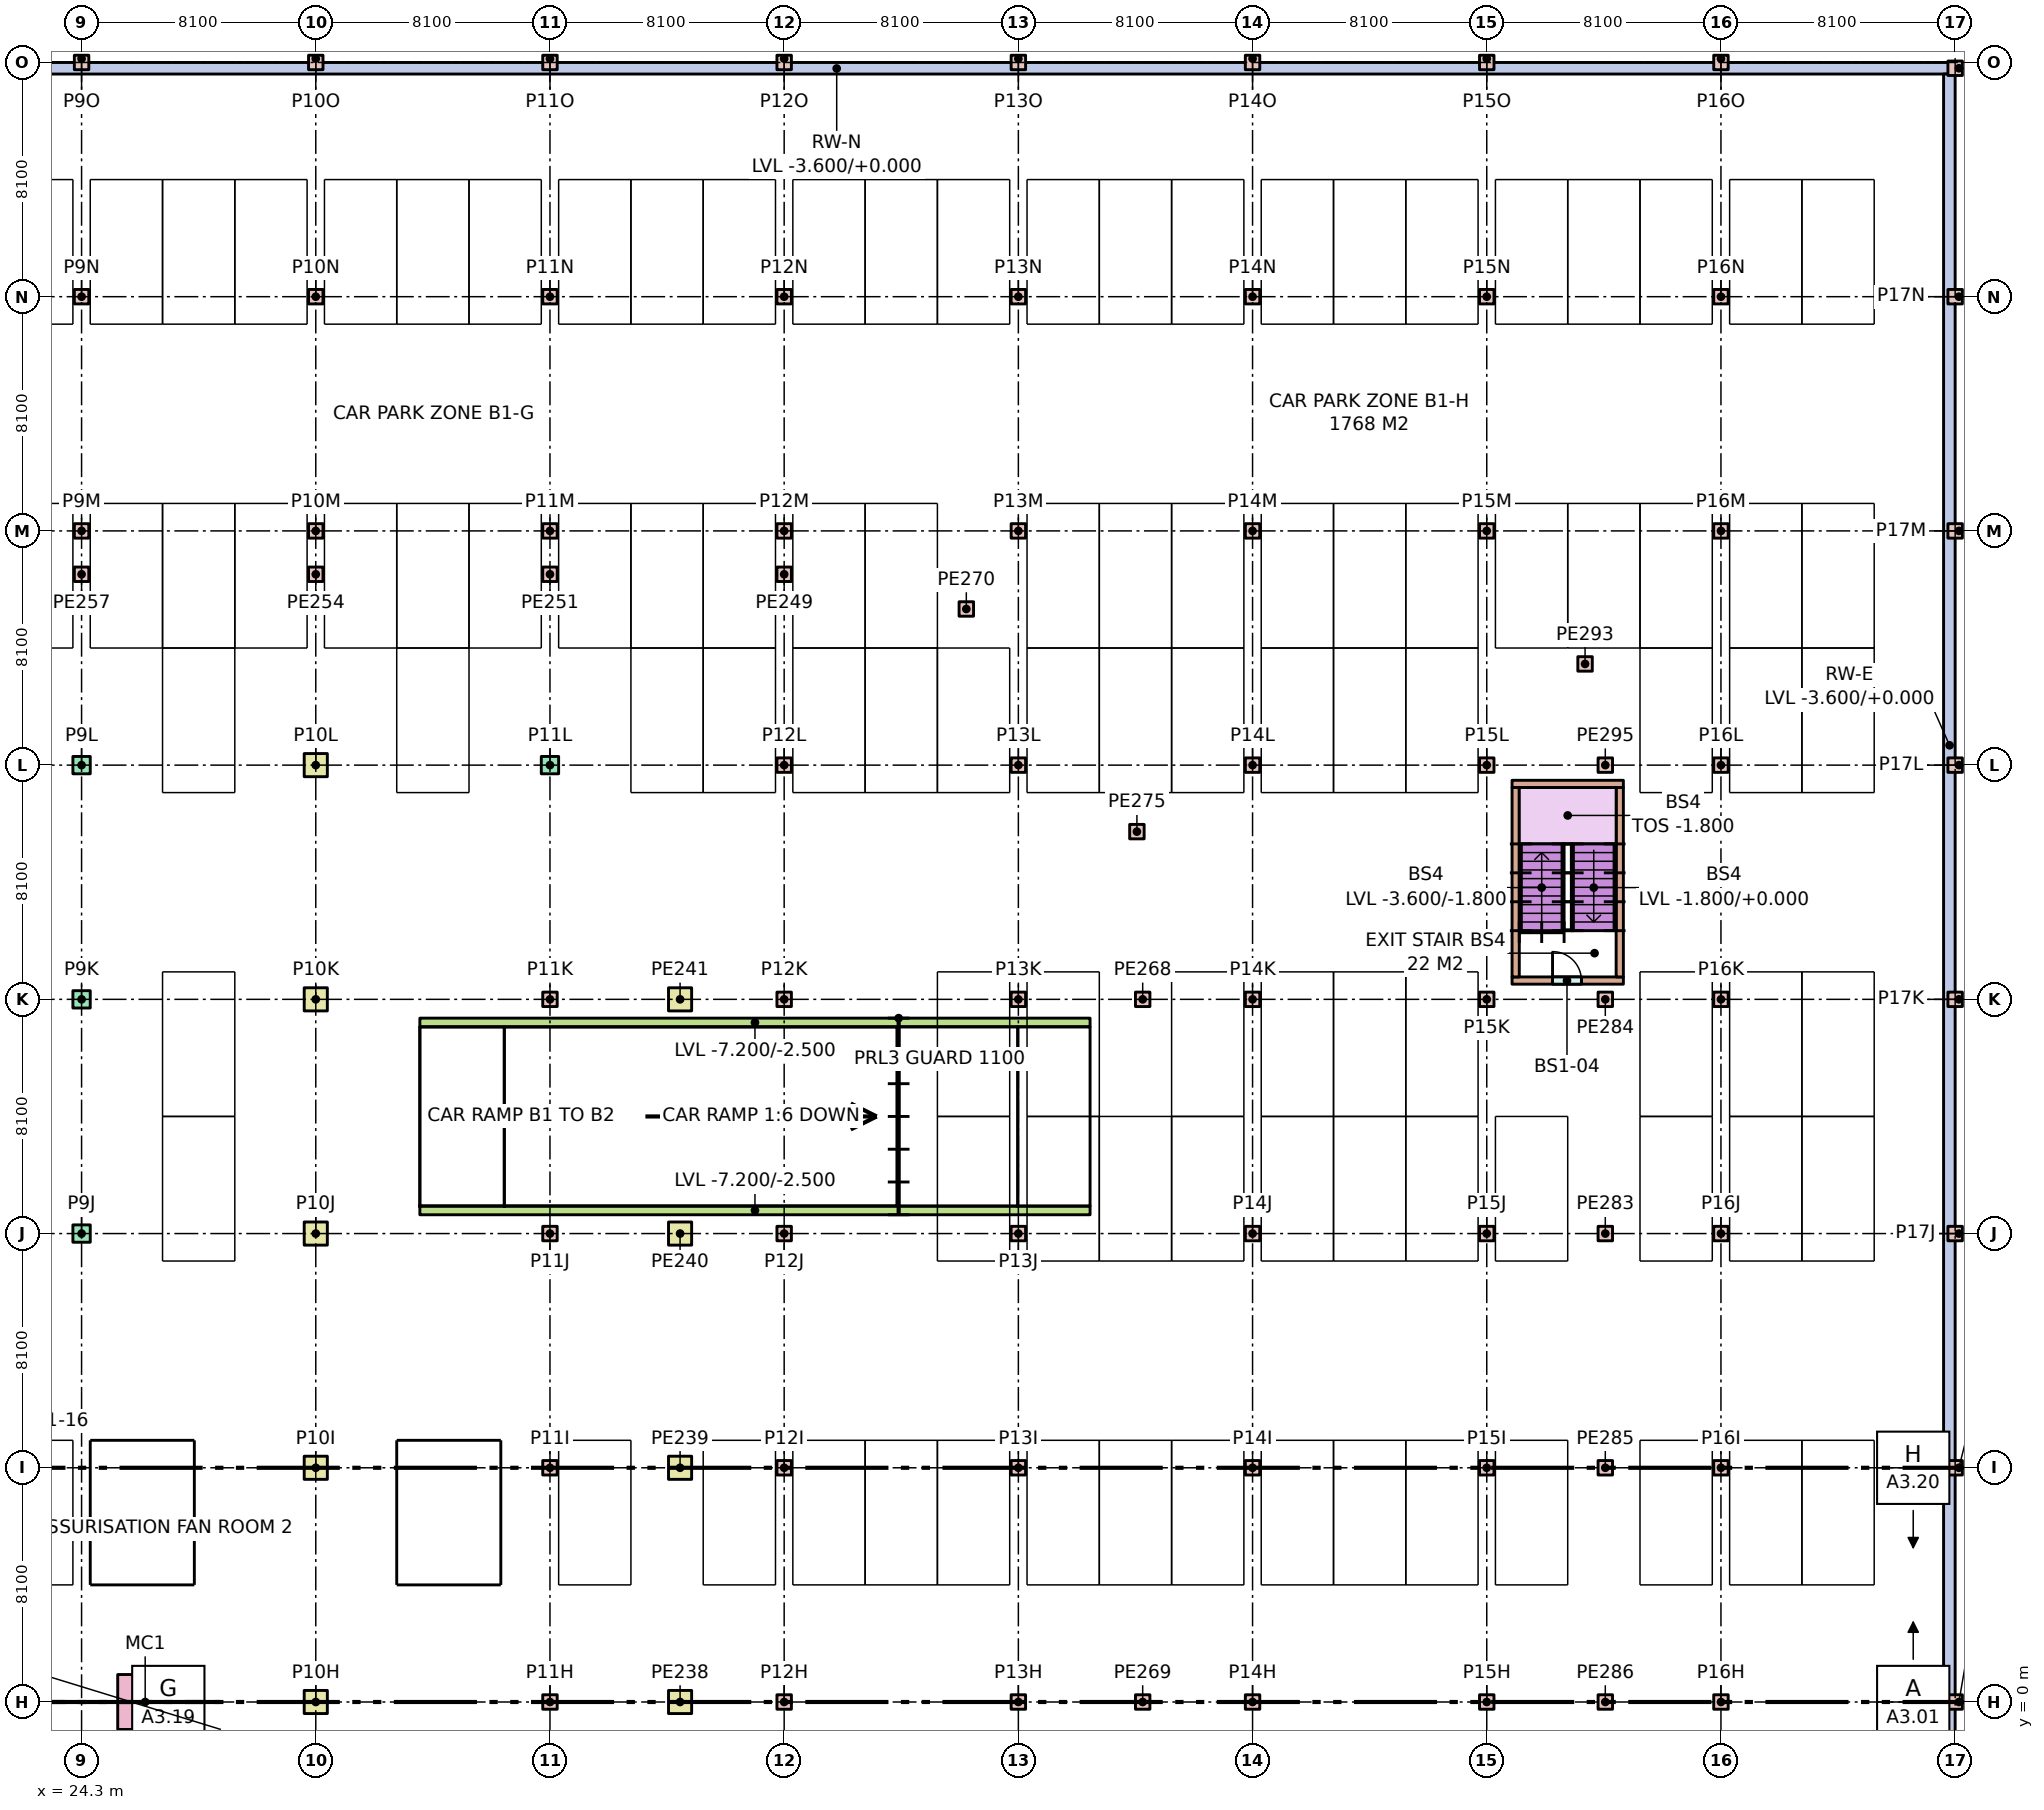
"""IFC4 building model, lengths in metres.
Left out: names, types, materials, properties, quantities, classifications, styles, units other than length and angle.
Written with IfcOpenShell. Run it as: python <this file> out.ifc"""

import sys

from ifc_helpers import new_model, si_unit, direction, frame, frame_2d, origin, origin_2d, place, context, subcontext, project, spatial, polyline, rectangle, outline, extrude, element, fill, save


model = new_model("IFC4")
c1 = context("Model", 3, precision=1e-05, world=origin(), true_north=direction((0.0, 1.0)))
c2 = subcontext(c1, "Body", "Model", "MODEL_VIEW")
j1 = project(units=[si_unit("LENGTHUNIT", "METRE"), si_unit("PLANEANGLEUNIT", "RADIAN")], contexts=[c1])
p1 = place(None, origin())
s1 = spatial("IfcSite", under=j1, at=p1, CompositionType="ELEMENT")
p2 = place(p1, origin())
s2 = spatial("IfcBuilding", under=s1, at=p2, CompositionType="ELEMENT")
p3 = place(p2, frame((0.0, 0.0, -3.6)))
s3 = spatial("IfcBuildingStorey", under=s2, at=p3, CompositionType="ELEMENT", Elevation=-3.6)
p4 = place(p3, frame((-40.5, 56.5, 0.0), z_axis=(0.0, 0.0, 1.0), x_axis=(1.0, 0.0, 0.0)))
e1 = element("IfcWall", 1, at=p4, inside=s3, PredefinedType="SOLIDWALL", context=c2, shape_type="SweptSolid", body=[
    extrude(rectangle(XDim=129.6, YDim=0.4, at=frame_2d((64.8, 0.0))), origin(), (0.0, 0.0, 1.0), 3.6),
])
p5 = place(p3, frame((88.9, -56.3, 0.0), z_axis=(0.0, 0.0, 1.0), x_axis=(0.0, 1.0, 0.0)))
e2 = element("IfcWall", 2, at=p5, inside=s3, PredefinedType="SOLIDWALL", context=c2, shape_type="SweptSolid", body=[
    extrude(rectangle(XDim=112.6, YDim=0.4, at=frame_2d((56.3, 0.0))), origin(), (0.0, 0.0, 1.0), 3.6),
])
for number, where, z_axis, x_axis in (
    (3, (24.3, 16.2, 0.0), (0.0, 0.0, 1.0), (1.0, 0.0, 0.0)),
    (4, (24.3, 24.3, 0.0), (0.0, 0.0, 1.0), (1.0, 0.0, 0.0)),
    (5, (24.3, 32.4, 0.0), (0.0, 0.0, 1.0), (1.0, 0.0, 0.0)),
):
    element("IfcColumn", number, at=place(p3, frame(where, z_axis=z_axis, x_axis=x_axis)), inside=s3, PredefinedType="COLUMN", context=c2, shape_type="SweptSolid", body=[
        extrude(rectangle(XDim=0.6, YDim=0.6, at=origin_2d()), origin(), (0.0, 0.0, 1.0), 3.6),
    ])
for number, where, z_axis, x_axis in (
    (6, (24.3, 40.5, 0.0), (0.0, 0.0, 1.0), (1.0, 0.0, 0.0)),
    (7, (24.3, 48.6, 0.0), (0.0, 0.0, 1.0), (1.0, 0.0, 0.0)),
    (8, (24.3, 56.7, 0.0), (0.0, 0.0, 1.0), (1.0, 0.0, 0.0)),
):
    element("IfcColumn", number, at=place(p3, frame(where, z_axis=z_axis, x_axis=x_axis)), inside=s3, PredefinedType="COLUMN", context=c2, shape_type="SweptSolid", body=[
        extrude(rectangle(XDim=0.5, YDim=0.5, at=origin_2d()), origin(), (0.0, 0.0, 1.0), 3.6),
    ])
for number, where, z_axis, x_axis in (
    (9, (32.4, 0.0, 0.0), (0.0, 0.0, 1.0), (1.0, 0.0, 0.0)),
    (10, (32.4, 8.1, 0.0), (0.0, 0.0, 1.0), (1.0, 0.0, 0.0)),
    (11, (32.4, 16.2, 0.0), (0.0, 0.0, 1.0), (1.0, 0.0, 0.0)),
    (12, (32.4, 24.3, 0.0), (0.0, 0.0, 1.0), (1.0, 0.0, 0.0)),
    (13, (32.4, 32.4, 0.0), (0.0, 0.0, 1.0), (1.0, 0.0, 0.0)),
):
    element("IfcColumn", number, at=place(p3, frame(where, z_axis=z_axis, x_axis=x_axis)), inside=s3, PredefinedType="COLUMN", context=c2, shape_type="SweptSolid", body=[
        extrude(rectangle(XDim=0.8, YDim=0.8, at=origin_2d()), origin(), (0.0, 0.0, 1.0), 3.6),
    ])
for number, where, z_axis, x_axis in (
    (14, (32.4, 40.5, 0.0), (0.0, 0.0, 1.0), (1.0, 0.0, 0.0)),
    (15, (32.4, 48.6, 0.0), (0.0, 0.0, 1.0), (1.0, 0.0, 0.0)),
    (16, (32.4, 56.7, 0.0), (0.0, 0.0, 1.0), (1.0, 0.0, 0.0)),
    (17, (40.5, 0.0, 0.0), (0.0, 0.0, 1.0), (1.0, 0.0, 0.0)),
    (18, (40.5, 8.1, 0.0), (0.0, 0.0, 1.0), (1.0, 0.0, 0.0)),
    (19, (40.5, 16.2, 0.0), (0.0, 0.0, 1.0), (1.0, 0.0, 0.0)),
    (20, (40.5, 24.3, 0.0), (0.0, 0.0, 1.0), (1.0, 0.0, 0.0)),
):
    element("IfcColumn", number, at=place(p3, frame(where, z_axis=z_axis, x_axis=x_axis)), inside=s3, PredefinedType="COLUMN", context=c2, shape_type="SweptSolid", body=[
        extrude(rectangle(XDim=0.5, YDim=0.5, at=origin_2d()), origin(), (0.0, 0.0, 1.0), 3.6),
    ])
p6 = place(p3, frame((40.5, 32.4, 0.0), z_axis=(0.0, 0.0, 1.0), x_axis=(1.0, 0.0, 0.0)))
e21 = element("IfcColumn", 21, at=p6, inside=s3, PredefinedType="COLUMN", context=c2, shape_type="SweptSolid", body=[
    extrude(rectangle(XDim=0.6, YDim=0.6, at=origin_2d()), origin(), (0.0, 0.0, 1.0), 3.6),
])
for number, where, z_axis, x_axis in (
    (22, (40.5, 40.5, 0.0), (0.0, 0.0, 1.0), (1.0, 0.0, 0.0)),
    (23, (40.5, 48.6, 0.0), (0.0, 0.0, 1.0), (1.0, 0.0, 0.0)),
    (24, (40.5, 56.7, 0.0), (0.0, 0.0, 1.0), (1.0, 0.0, 0.0)),
    (25, (48.6, 0.0, 0.0), (0.0, 0.0, 1.0), (1.0, 0.0, 0.0)),
    (26, (48.6, 8.1, 0.0), (0.0, 0.0, 1.0), (1.0, 0.0, 0.0)),
    (27, (48.6, 16.2, 0.0), (0.0, 0.0, 1.0), (1.0, 0.0, 0.0)),
    (28, (48.6, 24.3, 0.0), (0.0, 0.0, 1.0), (1.0, 0.0, 0.0)),
    (29, (48.6, 32.4, 0.0), (0.0, 0.0, 1.0), (1.0, 0.0, 0.0)),
    (30, (48.6, 40.5, 0.0), (0.0, 0.0, 1.0), (1.0, 0.0, 0.0)),
    (31, (48.6, 48.6, 0.0), (0.0, 0.0, 1.0), (1.0, 0.0, 0.0)),
    (32, (48.6, 56.7, 0.0), (0.0, 0.0, 1.0), (1.0, 0.0, 0.0)),
    (33, (56.7, 0.0, 0.0), (0.0, 0.0, 1.0), (1.0, 0.0, 0.0)),
    (34, (56.7, 8.1, 0.0), (0.0, 0.0, 1.0), (1.0, 0.0, 0.0)),
    (35, (56.7, 16.2, 0.0), (0.0, 0.0, 1.0), (1.0, 0.0, 0.0)),
    (36, (56.7, 24.3, 0.0), (0.0, 0.0, 1.0), (1.0, 0.0, 0.0)),
    (37, (56.7, 32.4, 0.0), (0.0, 0.0, 1.0), (1.0, 0.0, 0.0)),
    (38, (56.7, 40.5, 0.0), (0.0, 0.0, 1.0), (1.0, 0.0, 0.0)),
    (39, (56.7, 48.6, 0.0), (0.0, 0.0, 1.0), (1.0, 0.0, 0.0)),
    (40, (56.7, 56.7, 0.0), (0.0, 0.0, 1.0), (1.0, 0.0, 0.0)),
    (41, (64.8, 0.0, 0.0), (0.0, 0.0, 1.0), (1.0, 0.0, 0.0)),
    (42, (64.8, 8.1, 0.0), (0.0, 0.0, 1.0), (1.0, 0.0, 0.0)),
    (43, (64.8, 16.2, 0.0), (0.0, 0.0, 1.0), (1.0, 0.0, 0.0)),
    (44, (64.8, 24.3, 0.0), (0.0, 0.0, 1.0), (1.0, 0.0, 0.0)),
    (45, (64.8, 32.4, 0.0), (0.0, 0.0, 1.0), (1.0, 0.0, 0.0)),
    (46, (64.8, 40.5, 0.0), (0.0, 0.0, 1.0), (1.0, 0.0, 0.0)),
    (47, (64.8, 48.6, 0.0), (0.0, 0.0, 1.0), (1.0, 0.0, 0.0)),
    (48, (64.8, 56.7, 0.0), (0.0, 0.0, 1.0), (1.0, 0.0, 0.0)),
    (49, (72.9, 0.0, 0.0), (0.0, 0.0, 1.0), (1.0, 0.0, 0.0)),
    (50, (72.9, 8.1, 0.0), (0.0, 0.0, 1.0), (1.0, 0.0, 0.0)),
    (51, (72.9, 16.2, 0.0), (0.0, 0.0, 1.0), (1.0, 0.0, 0.0)),
    (52, (72.9, 24.3, 0.0), (0.0, 0.0, 1.0), (1.0, 0.0, 0.0)),
    (53, (72.9, 32.4, 0.0), (0.0, 0.0, 1.0), (1.0, 0.0, 0.0)),
    (54, (72.9, 40.5, 0.0), (0.0, 0.0, 1.0), (1.0, 0.0, 0.0)),
    (55, (72.9, 48.6, 0.0), (0.0, 0.0, 1.0), (1.0, 0.0, 0.0)),
    (56, (72.9, 56.7, 0.0), (0.0, 0.0, 1.0), (1.0, 0.0, 0.0)),
    (57, (81.0, 0.0, 0.0), (0.0, 0.0, 1.0), (1.0, 0.0, 0.0)),
    (58, (81.0, 8.1, 0.0), (0.0, 0.0, 1.0), (1.0, 0.0, 0.0)),
    (59, (81.0, 16.2, 0.0), (0.0, 0.0, 1.0), (1.0, 0.0, 0.0)),
    (60, (81.0, 24.3, 0.0), (0.0, 0.0, 1.0), (1.0, 0.0, 0.0)),
    (61, (81.0, 32.4, 0.0), (0.0, 0.0, 1.0), (1.0, 0.0, 0.0)),
    (62, (81.0, 40.5, 0.0), (0.0, 0.0, 1.0), (1.0, 0.0, 0.0)),
    (63, (81.0, 48.6, 0.0), (0.0, 0.0, 1.0), (1.0, 0.0, 0.0)),
    (64, (81.0, 56.7, 0.0), (0.0, 0.0, 1.0), (1.0, 0.0, 0.0)),
    (65, (89.1, 0.0, 0.0), (0.0, 0.0, 1.0), (1.0, 0.0, 0.0)),
    (66, (89.1, 8.1, 0.0), (0.0, 0.0, 1.0), (1.0, 0.0, 0.0)),
    (67, (89.1, 16.2, 0.0), (0.0, 0.0, 1.0), (1.0, 0.0, 0.0)),
    (68, (89.1, 24.3, 0.0), (0.0, 0.0, 1.0), (1.0, 0.0, 0.0)),
    (69, (89.1, 32.4, 0.0), (0.0, 0.0, 1.0), (1.0, 0.0, 0.0)),
    (70, (89.1, 40.5, 0.0), (0.0, 0.0, 1.0), (1.0, 0.0, 0.0)),
    (71, (89.1, 48.6, 0.0), (0.0, 0.0, 1.0), (1.0, 0.0, 0.0)),
    (72, (89.1, 56.5, 0.0), (0.0, 0.0, 1.0), (1.0, 0.0, 0.0)),
):
    element("IfcColumn", number, at=place(p3, frame(where, z_axis=z_axis, x_axis=x_axis)), inside=s3, PredefinedType="COLUMN", context=c2, shape_type="SweptSolid", body=[
        extrude(rectangle(XDim=0.5, YDim=0.5, at=origin_2d()), origin(), (0.0, 0.0, 1.0), 3.6),
    ])
for number, where, z_axis, x_axis in (
    (73, (45.0, 0.0, 0.0), (0.0, 0.0, 1.0), (1.0, 0.0, 0.0)),
    (74, (45.0, 8.1, 0.0), (0.0, 0.0, 1.0), (1.0, 0.0, 0.0)),
    (75, (45.0, 16.2, 0.0), (0.0, 0.0, 1.0), (1.0, 0.0, 0.0)),
    (76, (45.0, 24.3, 0.0), (0.0, 0.0, 1.0), (1.0, 0.0, 0.0)),
):
    element("IfcColumn", number, at=place(p3, frame(where, z_axis=z_axis, x_axis=x_axis)), inside=s3, PredefinedType="COLUMN", context=c2, shape_type="SweptSolid", body=[
        extrude(rectangle(XDim=0.8, YDim=0.8, at=origin_2d()), origin(), (0.0, 0.0, 1.0), 3.6),
    ])
for number, where, z_axis, x_axis in (
    (77, (48.6, 39.0, 0.0), (0.0, 0.0, 1.0), (1.0, 0.0, 0.0)),
    (78, (40.5, 39.0, 0.0), (0.0, 0.0, 1.0), (1.0, 0.0, 0.0)),
    (79, (32.4, 39.0, 0.0), (0.0, 0.0, 1.0), (1.0, 0.0, 0.0)),
    (80, (24.3, 39.0, 0.0), (0.0, 0.0, 1.0), (1.0, 0.0, 0.0)),
    (81, (61.0, 24.3, 0.0), (0.0, 0.0, 1.0), (1.0, 0.0, 0.0)),
    (82, (61.0, 0.0, 0.0), (0.0, 0.0, 1.0), (1.0, 0.0, 0.0)),
    (83, (54.9, 37.8, 0.0), (0.0, 0.0, 1.0), (1.0, 0.0, 0.0)),
    (84, (60.8, 30.1, 0.0), (0.0, 0.0, 1.0), (1.0, 0.0, 0.0)),
    (85, (77.0, 16.2, 0.0), (0.0, 0.0, 1.0), (1.0, 0.0, 0.0)),
    (86, (77.0, 24.3, 0.0), (0.0, 0.0, 1.0), (1.0, 0.0, 0.0)),
    (87, (77.0, 8.1, 0.0), (0.0, 0.0, 1.0), (1.0, 0.0, 0.0)),
    (88, (77.0, 0.0, 0.0), (0.0, 0.0, 1.0), (1.0, 0.0, 0.0)),
    (89, (76.3, 35.9, 0.0), (0.0, 0.0, 1.0), (1.0, 0.0, 0.0)),
    (90, (77.0, 32.4, 0.0), (0.0, 0.0, 1.0), (1.0, 0.0, 0.0)),
):
    element("IfcColumn", number, at=place(p3, frame(where, z_axis=z_axis, x_axis=x_axis)), inside=s3, PredefinedType="COLUMN", context=c2, shape_type="SweptSolid", body=[
        extrude(rectangle(XDim=0.5, YDim=0.5, at=origin_2d()), origin(), (0.0, 0.0, 1.0), 3.6),
    ])
p7 = place(p3, frame((26.5, 0.0, 0.0), z_axis=(0.0, 0.0, 1.0), x_axis=(0.0, 1.0, 0.0)))
e91 = element("IfcColumn", 91, at=p7, inside=s3, PredefinedType="COLUMN", context=c2, shape_type="SweptSolid", body=[
    extrude(rectangle(XDim=1.9, YDim=1.9, at=origin_2d()), origin(), (0.0, 0.0, 1.0), 3.6),
])
p8 = place(p3, frame((73.775, 24.95, 0.0), z_axis=(0.0, 0.0, 1.0), x_axis=(1.0, 0.0, 0.0)))
e92 = element("IfcWall", 92, at=p8, inside=s3, PredefinedType="STANDARD", context=c2, shape_type="SweptSolid", body=[
    extrude(rectangle(XDim=3.85, YDim=0.25, at=frame_2d((1.925, 0.0))), origin(), (0.0, 0.0, 1.0), 3.15),
])
p9 = place(p8, frame((1.4, 0.0, 0.0)))
e93 = element("IfcOpeningElement", 93, at=p9, cuts=e92, PredefinedType="OPENING", context=c2, shape_type="SweptSolid", body=[
    extrude(rectangle(XDim=1.0, YDim=2.1, at=frame_2d((0.5, 1.05))), frame((0.0, 0.135, 0.0), z_axis=(0.0, -1.0, 0.0), x_axis=(1.0, 0.0, 0.0)), (0.0, 0.0, 1.0), 0.27),
])
p10 = place(p3, frame((73.775, 31.75, 0.0), z_axis=(0.0, 0.0, 1.0), x_axis=(1.0, 0.0, 0.0)))
e94 = element("IfcWall", 94, at=p10, inside=s3, PredefinedType="STANDARD", context=c2, shape_type="SweptSolid", body=[
    extrude(rectangle(XDim=3.85, YDim=0.25, at=frame_2d((1.925, 0.0))), origin(), (0.0, 0.0, 1.0), 3.15),
])
for number, where, z_axis, x_axis in (
    (95, (73.9, 25.075, 0.0), (0.0, 0.0, 1.0), (0.0, 1.0, 0.0)),
    (96, (77.5, 25.075, 0.0), (0.0, 0.0, 1.0), (0.0, 1.0, 0.0)),
):
    element("IfcWall", number, at=place(p3, frame(where, z_axis=z_axis, x_axis=x_axis)), inside=s3, PredefinedType="STANDARD", context=c2, shape_type="SweptSolid", body=[
        extrude(rectangle(XDim=6.55, YDim=0.25, at=frame_2d((3.275, 0.0))), origin(), (0.0, 0.0, 1.0), 3.15),
    ])
for number, where, z_axis, x_axis in (
    (97, (36.0, 17.0, -3.6), (0.0, 0.0, 1.0), (1.0, 0.0, 0.0)),
    (98, (36.0, 23.5, -3.6), (0.0, 0.0, 1.0), (1.0, 0.0, 0.0)),
):
    element("IfcWall", number, at=place(p3, frame(where, z_axis=z_axis, x_axis=x_axis)), inside=s3, PredefinedType="STANDARD", context=c2, shape_type="SweptSolid", body=[
        extrude(outline(polyline([(0.0, 0.0), (23.18, 0.0), (23.18, 3.28), (16.502, 3.28), (16.5, 4.7), (0.0, 4.7), (0.0, 0.0)])), frame((0.0, 0.15, 0.0), z_axis=(0.0, -1.0, 0.0), x_axis=(1.0, 0.0, 0.0)), (0.0, 0.0, 1.0), 0.3),
    ])
p11 = place(p9, origin())
e99 = element("IfcDoor", 99, at=p11, inside=s3, OperationType="SINGLE_SWING_LEFT", PredefinedType="DOOR", context=c2, shape_type="SweptSolid", body=[
    extrude(rectangle(XDim=1.0, YDim=2.1, at=frame_2d((0.5, 1.05))), frame((0.0, 0.025, 0.0), z_axis=(0.0, -1.0, 0.0), x_axis=(1.0, 0.0, 0.0)), (0.0, 0.0, 1.0), 0.05),
])
fill(e93, e99)
save(model, sys.argv[1])
